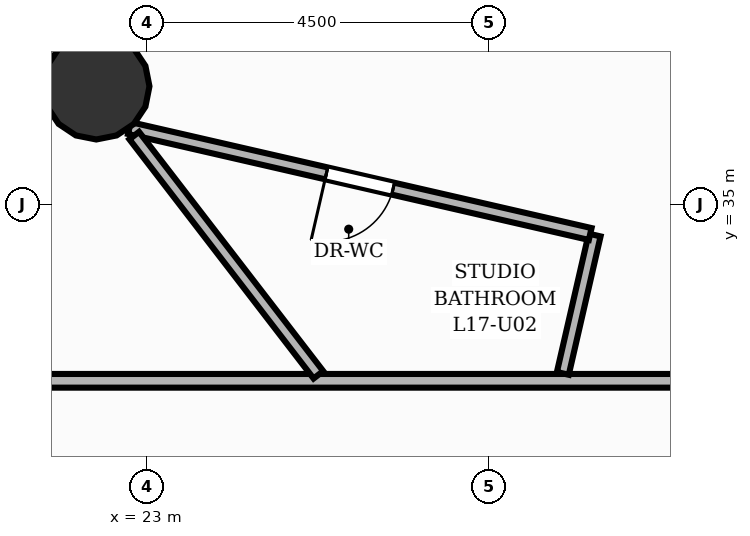
"""IFC4 building model, lengths in metres.
Left out: names, types, materials, properties, quantities, classifications, styles, units other than length and angle.
Written with IfcOpenShell. Run it as: python <this file> out.ifc"""

import sys

from ifc_helpers import new_model, si_unit, direction, frame, frame_2d, origin, origin_2d, place, context, subcontext, project, spatial, rectangle, circle, extrude, element, fill, save


model = new_model("IFC4")
c1 = context("Model", 3, precision=1e-05, world=origin(), true_north=direction((0.0, 1.0)))
c2 = subcontext(c1, "Body", "Model", "MODEL_VIEW")
j1 = project(units=[si_unit("LENGTHUNIT", "METRE"), si_unit("PLANEANGLEUNIT", "RADIAN")], contexts=[c1])
p1 = place(None, origin())
s1 = spatial("IfcSite", under=j1, at=p1, CompositionType="ELEMENT")
p2 = place(p1, origin())
s2 = spatial("IfcBuilding", under=s1, at=p2, CompositionType="ELEMENT")
p3 = place(p2, frame((0.0, 0.0, 60.0)))
s3 = spatial("IfcBuildingStorey", under=s2, at=p3, CompositionType="ELEMENT", Elevation=60.0)
p4 = place(p3, frame((22.333, 36.555, 0.0), z_axis=(0.0, 0.0, 1.0), x_axis=(1.0, 0.0, 0.0)))
e1 = element("IfcColumn", 1, at=p4, inside=s3, PredefinedType="COLUMN", context=c2, shape_type="SweptSolid", body=[
    extrude(circle(Radius=0.7, at=origin_2d()), origin(), (0.0, 0.0, 1.0), 3.2),
])
p5 = place(p3, frame((21.32, 32.68, 0.0), z_axis=(0.0, 0.0, 1.0), x_axis=(1.0, 0.0, 0.0)))
e2 = element("IfcWall", 2, at=p5, inside=s3, PredefinedType="PARTITIONING", context=c2, shape_type="SweptSolid", body=[
    extrude(rectangle(XDim=21.3, YDim=0.18, at=frame_2d((10.65, 0.0))), origin(), (0.0, 0.0, 1.0), 2.955),
])
p6 = place(p5, frame((13.68, 0.0, 0.0)))
e3 = element("IfcOpeningElement", 3, at=p6, cuts=e2, PredefinedType="OPENING", context=c2, shape_type="SweptSolid", body=[
    extrude(rectangle(XDim=1.05, YDim=2.15, at=frame_2d((0.525, 1.075))), frame((0.0, 0.1, 0.0), z_axis=(0.0, -1.0, 0.0), x_axis=(1.0, 0.0, 0.0)), (0.0, 0.0, 1.0), 0.2),
])
p7 = place(p3, frame((28.472, 32.778, 0.0), z_axis=(0.0, 0.0, 1.0), x_axis=(0.224134039234, 0.974558326862, 0.0)))
e4 = element("IfcWall", 4, at=p7, inside=s3, PredefinedType="PLUMBINGWALL", context=c2, shape_type="SweptSolid", body=[
    extrude(rectangle(XDim=1.868, YDim=0.16, at=frame_2d((0.934, 0.0))), origin(), (0.0, 0.0, 1.0), 2.955),
])
p8 = place(p3, frame((28.832, 34.612, 0.0), z_axis=(0.0, 0.0, 1.0), x_axis=(-0.97457275657, 0.224071288102, 0.0)))
e5 = element("IfcWall", 5, at=p8, inside=s3, PredefinedType="PLUMBINGWALL", context=c2, shape_type="SweptSolid", body=[
    extrude(rectangle(XDim=6.221, YDim=0.16, at=frame_2d((3.111, 0.0))), origin(), (0.0, 0.0, 1.0), 2.955),
])
p9 = place(p8, frame((2.661, 0.0, 0.0)))
e6 = element("IfcOpeningElement", 6, at=p9, cuts=e5, PredefinedType="OPENING", context=c2, shape_type="SweptSolid", body=[
    extrude(rectangle(XDim=0.9, YDim=2.1, at=frame_2d((0.45, 1.05))), frame((0.0, 0.09, 0.0), z_axis=(0.0, -1.0, 0.0), x_axis=(1.0, 0.0, 0.0)), (0.0, 0.0, 1.0), 0.18),
])
p10 = place(p3, frame((25.256, 32.759, 0.0), z_axis=(0.0, 0.0, 1.0), x_axis=(-0.610090898762, 0.792331430178, 0.0)))
e7 = element("IfcWall", 7, at=p10, inside=s3, PredefinedType="PLUMBINGWALL", context=c2, shape_type="SweptSolid", body=[
    extrude(rectangle(XDim=3.972, YDim=0.16, at=frame_2d((1.986, 0.0))), origin(), (0.0, 0.0, 1.0), 2.178),
])
p11 = place(p9, origin())
e8 = element("IfcDoor", 8, at=p11, inside=s3, OperationType="SINGLE_SWING_RIGHT", PredefinedType="DOOR", context=c2, shape_type="SweptSolid", body=[
    extrude(rectangle(XDim=0.9, YDim=2.1, at=frame_2d((0.45, 1.05))), frame((0.0, 0.025, 0.0), z_axis=(0.0, -1.0, 0.0), x_axis=(1.0, 0.0, 0.0)), (0.0, 0.0, 1.0), 0.05),
])
fill(e6, e8)
save(model, sys.argv[1])
